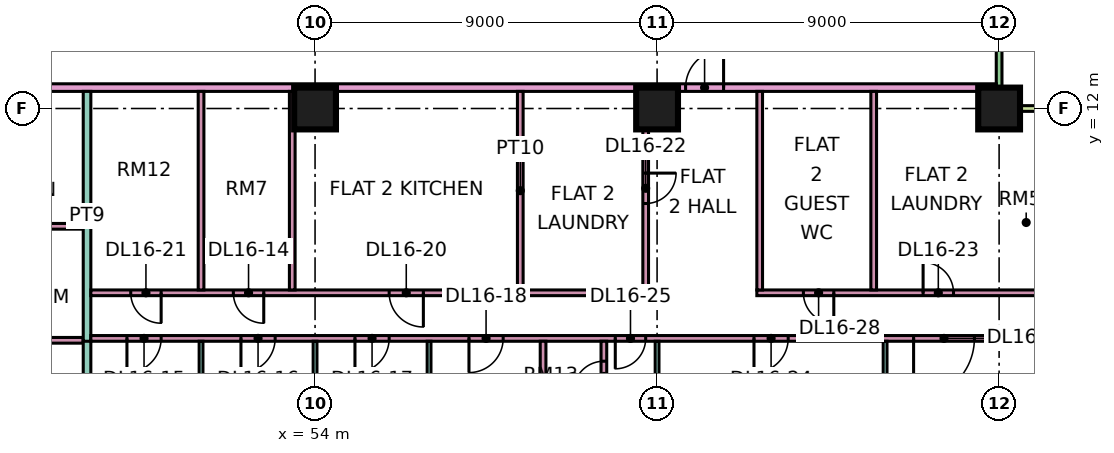
"""IFC4 building model, lengths in metres.
Left out: names, types, materials, properties, quantities, classifications, styles, units other than length and angle.
Written with IfcOpenShell. Run it as: python <this file> out.ifc"""

import sys

from ifc_helpers import new_model, si_unit, direction, frame, frame_2d, origin, origin_2d, place, context, subcontext, project, spatial, rectangle, extrude, element, fill, save


model = new_model("IFC4")
c1 = context("Model", 3, precision=1e-05, world=origin(), true_north=direction((0.0, 1.0)))
c2 = subcontext(c1, "Body", "Model", "MODEL_VIEW")
j1 = project(units=[si_unit("LENGTHUNIT", "METRE"), si_unit("PLANEANGLEUNIT", "RADIAN")], contexts=[c1])
p1 = place(None, origin())
s1 = spatial("IfcSite", under=j1, at=p1, CompositionType="ELEMENT")
p2 = place(p1, origin())
s2 = spatial("IfcBuilding", under=s1, at=p2, CompositionType="ELEMENT")
p3 = place(p2, frame((0.0, 0.0, 75.15)))
s3 = spatial("IfcBuildingStorey", under=s2, at=p3, CompositionType="ELEMENT", Elevation=75.15)
for number, where, z_axis, x_axis in (
    (1, (54.0, 12.0, 0.0), (0.0, 0.0, 1.0), (1.0, 0.0, 0.0)),
    (2, (63.0, 12.0, 0.0), (0.0, 0.0, 1.0), (1.0, 0.0, 0.0)),
    (3, (72.0, 12.0, 0.0), (0.0, 0.0, 1.0), (1.0, 0.0, 0.0)),
):
    element("IfcColumn", number, at=place(p3, frame(where, z_axis=z_axis, x_axis=x_axis)), inside=s3, PredefinedType="COLUMN", context=c2, shape_type="SweptSolid", body=[
        extrude(rectangle(XDim=1.1, YDim=1.1, at=origin_2d()), origin(), (0.0, 0.0, 1.0), 3.75),
    ])
p4 = place(p3, frame((72.0, 12.075, 0.0), z_axis=(0.0, 0.0, 1.0), x_axis=(0.0, 1.0, 0.0)))
e4 = element("IfcWall", 4, at=p4, inside=s3, PredefinedType="SOLIDWALL", context=c2, shape_type="SweptSolid", body=[
    extrude(rectangle(XDim=10.35, YDim=0.15, at=frame_2d((5.175, 0.0))), origin(), (0.0, 0.0, 1.0), 3.35),
])
p5 = place(p4, frame((3.975, 0.0, 0.45)))
e5 = element("IfcOpeningElement", 5, at=p5, cuts=e4, PredefinedType="OPENING", context=c2, shape_type="SweptSolid", body=[
    extrude(rectangle(XDim=2.4, YDim=2.4, at=frame_2d((1.2, 1.2))), frame((0.0, 0.085, 0.0), z_axis=(0.0, -1.0, 0.0), x_axis=(1.0, 0.0, 0.0)), (0.0, 0.0, 1.0), 0.17),
])
p6 = place(p4, frame((8.587, 0.0, 0.45)))
e6 = element("IfcOpeningElement", 6, at=p6, cuts=e4, PredefinedType="OPENING", context=c2, shape_type="SweptSolid", body=[
    extrude(rectangle(XDim=1.2, YDim=2.4, at=frame_2d((0.6, 1.2))), frame((0.0, 0.085, 0.0), z_axis=(0.0, -1.0, 0.0), x_axis=(1.0, 0.0, 0.0)), (0.0, 0.0, 1.0), 0.17),
])
p7 = place(p3, frame((73.5, 12.0, 0.0), z_axis=(0.0, 0.0, 1.0), x_axis=(-1.0, 0.0, 0.0)))
e7 = element("IfcWall", 7, at=p7, inside=s3, PredefinedType="SOLIDWALL", context=c2, shape_type="SweptSolid", body=[
    extrude(rectangle(XDim=1.5, YDim=0.15, at=frame_2d((0.75, 0.0))), origin(), (0.0, 0.0, 1.0), 3.35),
])
p8 = place(p3, frame((40.65, 12.55, 0.0), z_axis=(0.0, 0.0, 1.0), x_axis=(1.0, 0.0, 0.0)))
e8 = element("IfcWall", 8, at=p8, inside=s3, PredefinedType="PARTITIONING", context=c2, shape_type="SweptSolid", body=[
    extrude(rectangle(XDim=31.276, YDim=0.2, at=frame_2d((15.638, 0.0))), origin(), (0.0, 0.0, 1.0), 3.35),
])
p9 = place(p8, frame((23.1, 0.0, 0.0)))
e9 = element("IfcOpeningElement", 9, at=p9, cuts=e8, PredefinedType="OPENING", context=c2, shape_type="SweptSolid", body=[
    extrude(rectangle(XDim=1.0, YDim=2.1, at=frame_2d((0.5, 1.05))), frame((0.0, 0.11, 0.0), z_axis=(0.0, -1.0, 0.0), x_axis=(1.0, 0.0, 0.0)), (0.0, 0.0, 1.0), 0.22),
])
p10 = place(p8, frame((1.05, 0.0, 0.0)))
e10 = element("IfcOpeningElement", 10, at=p10, cuts=e8, PredefinedType="OPENING", context=c2, shape_type="SweptSolid", body=[
    extrude(rectangle(XDim=1.0, YDim=2.1, at=frame_2d((0.5, 1.05))), frame((0.0, 0.11, 0.0), z_axis=(0.0, -1.0, 0.0), x_axis=(1.0, 0.0, 0.0)), (0.0, 0.0, 1.0), 0.22),
])
p11 = place(p3, frame((43.725, 5.9, 0.0), z_axis=(0.0, 0.0, 1.0), x_axis=(1.0, 0.0, 0.0)))
e11 = element("IfcWall", 11, at=p11, inside=s3, PredefinedType="PARTITIONING", context=c2, shape_type="SweptSolid", body=[
    extrude(rectangle(XDim=4.175, YDim=0.15, at=frame_2d((2.087, 0.0))), origin(), (0.0, 0.0, 1.0), 3.35),
])
p12 = place(p11, frame((1.675, 0.0, 0.0)))
e12 = element("IfcOpeningElement", 12, at=p12, cuts=e11, PredefinedType="OPENING", context=c2, shape_type="SweptSolid", body=[
    extrude(rectangle(XDim=0.8, YDim=2.1, at=frame_2d((0.4, 1.05))), frame((0.0, 0.085, 0.0), z_axis=(0.0, -1.0, 0.0), x_axis=(1.0, 0.0, 0.0)), (0.0, 0.0, 1.0), 0.17),
])
p13 = place(p3, frame((43.725, 8.9, 0.0), z_axis=(0.0, 0.0, 1.0), x_axis=(1.0, 0.0, 0.0)))
e13 = element("IfcWall", 13, at=p13, inside=s3, PredefinedType="PARTITIONING", context=c2, shape_type="SweptSolid", body=[
    extrude(rectangle(XDim=4.175, YDim=0.15, at=frame_2d((2.087, 0.0))), origin(), (0.0, 0.0, 1.0), 3.35),
])
p14 = place(p3, frame((48.0, 0.0, 0.0), z_axis=(0.0, 0.0, 1.0), x_axis=(0.0, 1.0, 0.0)))
e14 = element("IfcWall", 14, at=p14, inside=s3, PredefinedType="PARTITIONING", context=c2, shape_type="SweptSolid", body=[
    extrude(rectangle(XDim=5.975, YDim=0.2, at=frame_2d((2.988, 0.0))), origin(), (0.0, 0.0, 1.0), 3.35),
])
p15 = place(p3, frame((48.0, 5.875, 0.0), z_axis=(0.0, 0.0, 1.0), x_axis=(0.0, 1.0, 0.0)))
e15 = element("IfcWall", 15, at=p15, inside=s3, PredefinedType="PARTITIONING", context=c2, shape_type="SweptSolid", body=[
    extrude(rectangle(XDim=6.575, YDim=0.2, at=frame_2d((3.288, 0.0))), origin(), (0.0, 0.0, 1.0), 3.35),
])
p16 = place(p3, frame((48.1, 5.95, 0.0), z_axis=(0.0, 0.0, 1.0), x_axis=(1.0, 0.0, 0.0)))
e16 = element("IfcWall", 16, at=p16, inside=s3, PredefinedType="PARTITIONING", context=c2, shape_type="SweptSolid", body=[
    extrude(rectangle(XDim=25.25, YDim=0.15, at=frame_2d((12.625, 0.0))), origin(), (0.0, 0.0, 1.0), 3.35),
])
p17 = place(p16, frame((0.95, 0.0, 0.0)))
e17 = element("IfcOpeningElement", 17, at=p17, cuts=e16, PredefinedType="OPENING", context=c2, shape_type="SweptSolid", body=[
    extrude(rectangle(XDim=0.9, YDim=2.1, at=frame_2d((0.45, 1.05))), frame((0.0, 0.085, 0.0), z_axis=(0.0, -1.0, 0.0), x_axis=(1.0, 0.0, 0.0)), (0.0, 0.0, 1.0), 0.17),
])
p18 = place(p16, frame((3.95, 0.0, 0.0)))
e18 = element("IfcOpeningElement", 18, at=p18, cuts=e16, PredefinedType="OPENING", context=c2, shape_type="SweptSolid", body=[
    extrude(rectangle(XDim=0.9, YDim=2.1, at=frame_2d((0.45, 1.05))), frame((0.0, 0.085, 0.0), z_axis=(0.0, -1.0, 0.0), x_axis=(1.0, 0.0, 0.0)), (0.0, 0.0, 1.0), 0.17),
])
p19 = place(p16, frame((6.95, 0.0, 0.0)))
e19 = element("IfcOpeningElement", 19, at=p19, cuts=e16, PredefinedType="OPENING", context=c2, shape_type="SweptSolid", body=[
    extrude(rectangle(XDim=0.9, YDim=2.1, at=frame_2d((0.45, 1.05))), frame((0.0, 0.085, 0.0), z_axis=(0.0, -1.0, 0.0), x_axis=(1.0, 0.0, 0.0)), (0.0, 0.0, 1.0), 0.17),
])
p20 = place(p16, frame((9.95, 0.0, 0.0)))
e20 = element("IfcOpeningElement", 20, at=p20, cuts=e16, PredefinedType="OPENING", context=c2, shape_type="SweptSolid", body=[
    extrude(rectangle(XDim=0.9, YDim=2.1, at=frame_2d((0.45, 1.05))), frame((0.0, 0.085, 0.0), z_axis=(0.0, -1.0, 0.0), x_axis=(1.0, 0.0, 0.0)), (0.0, 0.0, 1.0), 0.17),
])
p21 = place(p16, frame((17.45, 0.0, 0.0)))
e21 = element("IfcOpeningElement", 21, at=p21, cuts=e16, PredefinedType="OPENING", context=c2, shape_type="SweptSolid", body=[
    extrude(rectangle(XDim=0.9, YDim=2.1, at=frame_2d((0.45, 1.05))), frame((0.0, 0.085, 0.0), z_axis=(0.0, -1.0, 0.0), x_axis=(1.0, 0.0, 0.0)), (0.0, 0.0, 1.0), 0.17),
])
p22 = place(p16, frame((13.8, 0.0, 0.0)))
e22 = element("IfcOpeningElement", 22, at=p22, cuts=e16, PredefinedType="OPENING", context=c2, shape_type="SweptSolid", body=[
    extrude(rectangle(XDim=0.8, YDim=2.1, at=frame_2d((0.4, 1.05))), frame((0.0, 0.085, 0.0), z_axis=(0.0, -1.0, 0.0), x_axis=(1.0, 0.0, 0.0)), (0.0, 0.0, 1.0), 0.17),
])
p23 = place(p16, frame((21.65, 0.0, 0.0)))
e23 = element("IfcOpeningElement", 23, at=p23, cuts=e16, PredefinedType="OPENING", context=c2, shape_type="SweptSolid", body=[
    extrude(rectangle(XDim=1.6, YDim=2.1, at=frame_2d((0.8, 1.05))), frame((0.0, 0.085, 0.0), z_axis=(0.0, -1.0, 0.0), x_axis=(1.0, 0.0, 0.0)), (0.0, 0.0, 1.0), 0.17),
])
p24 = place(p3, frame((48.1, 7.15, 0.0), z_axis=(0.0, 0.0, 1.0), x_axis=(1.0, 0.0, 0.0)))
e24 = element("IfcWall", 24, at=p24, inside=s3, PredefinedType="PARTITIONING", context=c2, shape_type="SweptSolid", body=[
    extrude(rectangle(XDim=14.675, YDim=0.15, at=frame_2d((7.337, 0.0))), origin(), (0.0, 0.0, 1.0), 3.35),
])
p25 = place(p24, frame((3.75, 0.0, 0.0)))
e25 = element("IfcOpeningElement", 25, at=p25, cuts=e24, PredefinedType="OPENING", context=c2, shape_type="SweptSolid", body=[
    extrude(rectangle(XDim=0.8, YDim=2.1, at=frame_2d((0.4, 1.05))), frame((0.0, 0.085, 0.0), z_axis=(0.0, -1.0, 0.0), x_axis=(1.0, 0.0, 0.0)), (0.0, 0.0, 1.0), 0.17),
])
p26 = place(p24, frame((7.85, 0.0, 0.0)))
e26 = element("IfcOpeningElement", 26, at=p26, cuts=e24, PredefinedType="OPENING", context=c2, shape_type="SweptSolid", body=[
    extrude(rectangle(XDim=0.9, YDim=2.1, at=frame_2d((0.45, 1.05))), frame((0.0, 0.085, 0.0), z_axis=(0.0, -1.0, 0.0), x_axis=(1.0, 0.0, 0.0)), (0.0, 0.0, 1.0), 0.17),
])
p27 = place(p24, frame((1.05, 0.0, 0.0)))
e27 = element("IfcOpeningElement", 27, at=p27, cuts=e24, PredefinedType="OPENING", context=c2, shape_type="SweptSolid", body=[
    extrude(rectangle(XDim=0.8, YDim=2.1, at=frame_2d((0.4, 1.05))), frame((0.0, 0.085, 0.0), z_axis=(0.0, -1.0, 0.0), x_axis=(1.0, 0.0, 0.0)), (0.0, 0.0, 1.0), 0.17),
])
p28 = place(p3, frame((51.0, -1.351, 0.0), z_axis=(0.0, 0.0, 1.0), x_axis=(0.0, 1.0, 0.0)))
e28 = element("IfcWall", 28, at=p28, inside=s3, PredefinedType="PARTITIONING", context=c2, shape_type="SweptSolid", body=[
    extrude(rectangle(XDim=7.226, YDim=0.1, at=frame_2d((3.613, 0.0))), origin(), (0.0, 0.0, 1.0), 3.35),
])
for number, where, z_axis, x_axis in (
    (29, (51.0, 7.225, 0.0), (0.0, 0.0, 1.0), (0.0, 1.0, 0.0)),
    (30, (53.4, 7.225, 0.0), (0.0, 0.0, 1.0), (0.0, 1.0, 0.0)),
):
    element("IfcWall", number, at=place(p3, frame(where, z_axis=z_axis, x_axis=x_axis)), inside=s3, PredefinedType="PARTITIONING", context=c2, shape_type="SweptSolid", body=[
        extrude(rectangle(XDim=5.225, YDim=0.15, at=frame_2d((2.612, 0.0))), origin(), (0.0, 0.0, 1.0), 3.35),
    ])
for number, where, z_axis, x_axis in (
    (31, (54.0, -1.351, 0.0), (0.0, 0.0, 1.0), (0.0, 1.0, 0.0)),
    (32, (57.0, -1.351, 0.0), (0.0, 0.0, 1.0), (0.0, 1.0, 0.0)),
):
    element("IfcWall", number, at=place(p3, frame(where, z_axis=z_axis, x_axis=x_axis)), inside=s3, PredefinedType="PARTITIONING", context=c2, shape_type="SweptSolid", body=[
        extrude(rectangle(XDim=7.226, YDim=0.1, at=frame_2d((3.613, 0.0))), origin(), (0.0, 0.0, 1.0), 3.35),
    ])
p29 = place(p3, frame((59.4, 7.225, 0.0), z_axis=(0.0, 0.0, 1.0), x_axis=(0.0, 1.0, 0.0)))
e33 = element("IfcWall", 33, at=p29, inside=s3, PredefinedType="PARTITIONING", context=c2, shape_type="SweptSolid", body=[
    extrude(rectangle(XDim=5.225, YDim=0.15, at=frame_2d((2.612, 0.0))), origin(), (0.0, 0.0, 1.0), 3.35),
])
p30 = place(p3, frame((60.0, 0.0, 0.0), z_axis=(0.0, 0.0, 1.0), x_axis=(0.0, 1.0, 0.0)))
e34 = element("IfcWall", 34, at=p30, inside=s3, PredefinedType="PARTITIONING", context=c2, shape_type="SweptSolid", body=[
    extrude(rectangle(XDim=5.875, YDim=0.15, at=frame_2d((2.938, 0.0))), origin(), (0.0, 0.0, 1.0), 3.35),
])
p31 = place(p3, frame((61.6, 3.875, 0.0), z_axis=(0.0, 0.0, 1.0), x_axis=(0.0, 1.0, 0.0)))
e35 = element("IfcWall", 35, at=p31, inside=s3, PredefinedType="PARTITIONING", context=c2, shape_type="SweptSolid", body=[
    extrude(rectangle(XDim=2.0, YDim=0.15, at=frame_2d((1.0, 0.0))), origin(), (0.0, 0.0, 1.0), 3.35),
])
p32 = place(p31, frame((0.675, 0.0, 0.0)))
e36 = element("IfcOpeningElement", 36, at=p32, cuts=e35, PredefinedType="OPENING", context=c2, shape_type="SweptSolid", body=[
    extrude(rectangle(XDim=0.8, YDim=2.1, at=frame_2d((0.4, 1.05))), frame((0.0, 0.085, 0.0), z_axis=(0.0, -1.0, 0.0), x_axis=(1.0, 0.0, 0.0)), (0.0, 0.0, 1.0), 0.17),
])
p33 = place(p3, frame((62.7, 7.225, 0.0), z_axis=(0.0, 0.0, 1.0), x_axis=(0.0, 1.0, 0.0)))
e37 = element("IfcWall", 37, at=p33, inside=s3, PredefinedType="PARTITIONING", context=c2, shape_type="SweptSolid", body=[
    extrude(rectangle(XDim=5.225, YDim=0.15, at=frame_2d((2.612, 0.0))), origin(), (0.0, 0.0, 1.0), 3.35),
])
p34 = place(p33, frame((2.275, 0.0, 0.0)))
e38 = element("IfcOpeningElement", 38, at=p34, cuts=e37, PredefinedType="OPENING", context=c2, shape_type="SweptSolid", body=[
    extrude(rectangle(XDim=0.8, YDim=2.1, at=frame_2d((0.4, 1.05))), frame((0.0, 0.085, 0.0), z_axis=(0.0, -1.0, 0.0), x_axis=(1.0, 0.0, 0.0)), (0.0, 0.0, 1.0), 0.17),
])
p35 = place(p3, frame((63.0, 0.074, 0.0), z_axis=(0.0, 0.0, 1.0), x_axis=(0.0, 1.0, 0.0)))
e39 = element("IfcWall", 39, at=p35, inside=s3, PredefinedType="PARTITIONING", context=c2, shape_type="SweptSolid", body=[
    extrude(rectangle(XDim=5.801, YDim=0.1, at=frame_2d((2.9, 0.0))), origin(), (0.0, 0.0, 1.0), 3.35),
])
p36 = place(p3, frame((65.625, 7.15, 0.0), z_axis=(0.0, 0.0, 1.0), x_axis=(1.0, 0.0, 0.0)))
e40 = element("IfcWall", 40, at=p36, inside=s3, PredefinedType="PARTITIONING", context=c2, shape_type="SweptSolid", body=[
    extrude(rectangle(XDim=7.725, YDim=0.15, at=frame_2d((3.863, 0.0))), origin(), (0.0, 0.0, 1.0), 3.35),
])
p37 = place(p36, frame((4.375, 0.0, 0.0)))
e41 = element("IfcOpeningElement", 41, at=p37, cuts=e40, PredefinedType="OPENING", context=c2, shape_type="SweptSolid", body=[
    extrude(rectangle(XDim=0.8, YDim=2.1, at=frame_2d((0.4, 1.05))), frame((0.0, 0.085, 0.0), z_axis=(0.0, -1.0, 0.0), x_axis=(1.0, 0.0, 0.0)), (0.0, 0.0, 1.0), 0.17),
])
p38 = place(p36, frame((1.225, 0.0, 0.0)))
e42 = element("IfcOpeningElement", 42, at=p38, cuts=e40, PredefinedType="OPENING", context=c2, shape_type="SweptSolid", body=[
    extrude(rectangle(XDim=0.8, YDim=2.1, at=frame_2d((0.4, 1.05))), frame((0.0, 0.085, 0.0), z_axis=(0.0, -1.0, 0.0), x_axis=(1.0, 0.0, 0.0)), (0.0, 0.0, 1.0), 0.17),
])
for number, where, z_axis, x_axis in (
    (43, (65.7, 7.225, 0.0), (0.0, 0.0, 1.0), (0.0, 1.0, 0.0)),
    (44, (68.7, 7.225, 0.0), (0.0, 0.0, 1.0), (0.0, 1.0, 0.0)),
):
    element("IfcWall", number, at=place(p3, frame(where, z_axis=z_axis, x_axis=x_axis)), inside=s3, PredefinedType="PARTITIONING", context=c2, shape_type="SweptSolid", body=[
        extrude(rectangle(XDim=5.225, YDim=0.15, at=frame_2d((2.612, 0.0))), origin(), (0.0, 0.0, 1.0), 3.35),
    ])
p39 = place(p3, frame((69.0, 0.074, 0.0), z_axis=(0.0, 0.0, 1.0), x_axis=(0.0, 1.0, 0.0)))
e45 = element("IfcWall", 45, at=p39, inside=s3, PredefinedType="PARTITIONING", context=c2, shape_type="SweptSolid", body=[
    extrude(rectangle(XDim=5.801, YDim=0.1, at=frame_2d((2.9, 0.0))), origin(), (0.0, 0.0, 1.0), 3.35),
])
p40 = place(p25, origin())
e46 = element("IfcDoor", 46, at=p40, inside=s3, OperationType="SINGLE_SWING_RIGHT", PredefinedType="DOOR", context=c2, shape_type="SweptSolid", body=[
    extrude(rectangle(XDim=0.8, YDim=2.1, at=frame_2d((0.4, 1.05))), frame((0.0, 0.025, 0.0), z_axis=(0.0, -1.0, 0.0), x_axis=(1.0, 0.0, 0.0)), (0.0, 0.0, 1.0), 0.05),
])
fill(e25, e46)
p41 = place(p17, frame((0.9, 0.0, 0.0), z_axis=(0.0, 0.0, 1.0), x_axis=(-1.0, 0.0, 0.0)))
e47 = element("IfcDoor", 47, at=p41, inside=s3, OperationType="SINGLE_SWING_LEFT", PredefinedType="DOOR", context=c2, shape_type="SweptSolid", body=[
    extrude(rectangle(XDim=0.9, YDim=2.1, at=frame_2d((0.45, 1.05))), frame((0.0, 0.025, 0.0), z_axis=(0.0, -1.0, 0.0), x_axis=(1.0, 0.0, 0.0)), (0.0, 0.0, 1.0), 0.05),
])
fill(e17, e47)
p42 = place(p18, frame((0.9, 0.0, 0.0), z_axis=(0.0, 0.0, 1.0), x_axis=(-1.0, 0.0, 0.0)))
e48 = element("IfcDoor", 48, at=p42, inside=s3, OperationType="SINGLE_SWING_LEFT", PredefinedType="DOOR", context=c2, shape_type="SweptSolid", body=[
    extrude(rectangle(XDim=0.9, YDim=2.1, at=frame_2d((0.45, 1.05))), frame((0.0, 0.025, 0.0), z_axis=(0.0, -1.0, 0.0), x_axis=(1.0, 0.0, 0.0)), (0.0, 0.0, 1.0), 0.05),
])
fill(e18, e48)
p43 = place(p19, frame((0.9, 0.0, 0.0), z_axis=(0.0, 0.0, 1.0), x_axis=(-1.0, 0.0, 0.0)))
e49 = element("IfcDoor", 49, at=p43, inside=s3, OperationType="SINGLE_SWING_LEFT", PredefinedType="DOOR", context=c2, shape_type="SweptSolid", body=[
    extrude(rectangle(XDim=0.9, YDim=2.1, at=frame_2d((0.45, 1.05))), frame((0.0, 0.025, 0.0), z_axis=(0.0, -1.0, 0.0), x_axis=(1.0, 0.0, 0.0)), (0.0, 0.0, 1.0), 0.05),
])
fill(e19, e49)
p44 = place(p20, frame((0.9, 0.0, 0.0), z_axis=(0.0, 0.0, 1.0), x_axis=(-1.0, 0.0, 0.0)))
e50 = element("IfcDoor", 50, at=p44, inside=s3, OperationType="SINGLE_SWING_LEFT", PredefinedType="DOOR", context=c2, shape_type="SweptSolid", body=[
    extrude(rectangle(XDim=0.9, YDim=2.1, at=frame_2d((0.45, 1.05))), frame((0.0, 0.025, 0.0), z_axis=(0.0, -1.0, 0.0), x_axis=(1.0, 0.0, 0.0)), (0.0, 0.0, 1.0), 0.05),
])
fill(e20, e50)
p45 = place(p9, frame((1.0, 0.0, 0.0), z_axis=(0.0, 0.0, 1.0), x_axis=(-1.0, 0.0, 0.0)))
e51 = element("IfcDoor", 51, at=p45, inside=s3, OperationType="SINGLE_SWING_RIGHT", PredefinedType="DOOR", context=c2, shape_type="SweptSolid", body=[
    extrude(rectangle(XDim=1.0, YDim=2.1, at=frame_2d((0.5, 1.05))), frame((0.0, 0.025, 0.0), z_axis=(0.0, -1.0, 0.0), x_axis=(1.0, 0.0, 0.0)), (0.0, 0.0, 1.0), 0.05),
])
fill(e9, e51)
p46 = place(p26, origin())
e52 = element("IfcDoor", 52, at=p46, inside=s3, OperationType="SINGLE_SWING_RIGHT", PredefinedType="DOOR", context=c2, shape_type="SweptSolid", body=[
    extrude(rectangle(XDim=0.9, YDim=2.1, at=frame_2d((0.45, 1.05))), frame((0.0, 0.025, 0.0), z_axis=(0.0, -1.0, 0.0), x_axis=(1.0, 0.0, 0.0)), (0.0, 0.0, 1.0), 0.05),
])
fill(e26, e52)
p47 = place(p27, origin())
e53 = element("IfcDoor", 53, at=p47, inside=s3, OperationType="SINGLE_SWING_RIGHT", PredefinedType="DOOR", context=c2, shape_type="SweptSolid", body=[
    extrude(rectangle(XDim=0.8, YDim=2.1, at=frame_2d((0.4, 1.05))), frame((0.0, 0.025, 0.0), z_axis=(0.0, -1.0, 0.0), x_axis=(1.0, 0.0, 0.0)), (0.0, 0.0, 1.0), 0.05),
])
fill(e27, e53)
p48 = place(p34, origin())
e54 = element("IfcDoor", 54, at=p48, inside=s3, OperationType="SINGLE_SWING_RIGHT", PredefinedType="DOOR", context=c2, shape_type="SweptSolid", body=[
    extrude(rectangle(XDim=0.8, YDim=2.1, at=frame_2d((0.4, 1.05))), frame((0.0, 0.025, 0.0), z_axis=(0.0, -1.0, 0.0), x_axis=(1.0, 0.0, 0.0)), (0.0, 0.0, 1.0), 0.05),
])
fill(e38, e54)
p49 = place(p37, origin())
e55 = element("IfcDoor", 55, at=p49, inside=s3, OperationType="SINGLE_SWING_LEFT", PredefinedType="DOOR", context=c2, shape_type="SweptSolid", body=[
    extrude(rectangle(XDim=0.8, YDim=2.1, at=frame_2d((0.4, 1.05))), frame((0.0, 0.025, 0.0), z_axis=(0.0, -1.0, 0.0), x_axis=(1.0, 0.0, 0.0)), (0.0, 0.0, 1.0), 0.05),
])
fill(e41, e55)
p50 = place(p21, frame((0.9, 0.0, 0.0), z_axis=(0.0, 0.0, 1.0), x_axis=(-1.0, 0.0, 0.0)))
e56 = element("IfcDoor", 56, at=p50, inside=s3, OperationType="SINGLE_SWING_LEFT", PredefinedType="DOOR", context=c2, shape_type="SweptSolid", body=[
    extrude(rectangle(XDim=0.9, YDim=2.1, at=frame_2d((0.45, 1.05))), frame((0.0, 0.025, 0.0), z_axis=(0.0, -1.0, 0.0), x_axis=(1.0, 0.0, 0.0)), (0.0, 0.0, 1.0), 0.05),
])
fill(e21, e56)
p51 = place(p22, frame((0.8, 0.0, 0.0), z_axis=(0.0, 0.0, 1.0), x_axis=(-1.0, 0.0, 0.0)))
e57 = element("IfcDoor", 57, at=p51, inside=s3, OperationType="SINGLE_SWING_LEFT", PredefinedType="DOOR", context=c2, shape_type="SweptSolid", body=[
    extrude(rectangle(XDim=0.8, YDim=2.1, at=frame_2d((0.4, 1.05))), frame((0.0, 0.025, 0.0), z_axis=(0.0, -1.0, 0.0), x_axis=(1.0, 0.0, 0.0)), (0.0, 0.0, 1.0), 0.05),
])
fill(e22, e57)
p52 = place(p32, origin())
e58 = element("IfcDoor", 58, at=p52, inside=s3, OperationType="SINGLE_SWING_LEFT", PredefinedType="DOOR", context=c2, shape_type="SweptSolid", body=[
    extrude(rectangle(XDim=0.8, YDim=2.1, at=frame_2d((0.4, 1.05))), frame((0.0, 0.025, 0.0), z_axis=(0.0, -1.0, 0.0), x_axis=(1.0, 0.0, 0.0)), (0.0, 0.0, 1.0), 0.05),
])
fill(e36, e58)
p53 = place(p23, frame((1.6, 0.0, 0.0), z_axis=(0.0, 0.0, 1.0), x_axis=(-1.0, 0.0, 0.0)))
e59 = element("IfcDoor", 59, at=p53, inside=s3, OperationType="DOUBLE_DOOR_SINGLE_SWING", PredefinedType="DOOR", context=c2, shape_type="SweptSolid", body=[
    extrude(rectangle(XDim=1.6, YDim=2.1, at=frame_2d((0.8, 1.05))), frame((0.0, 0.025, 0.0), z_axis=(0.0, -1.0, 0.0), x_axis=(1.0, 0.0, 0.0)), (0.0, 0.0, 1.0), 0.05),
])
fill(e23, e59)
p54 = place(p38, origin())
e60 = element("IfcDoor", 60, at=p54, inside=s3, OperationType="SINGLE_SWING_RIGHT", PredefinedType="DOOR", context=c2, shape_type="SweptSolid", body=[
    extrude(rectangle(XDim=0.8, YDim=2.1, at=frame_2d((0.4, 1.05))), frame((0.0, 0.025, 0.0), z_axis=(0.0, -1.0, 0.0), x_axis=(1.0, 0.0, 0.0)), (0.0, 0.0, 1.0), 0.05),
])
fill(e42, e60)
save(model, sys.argv[1])
